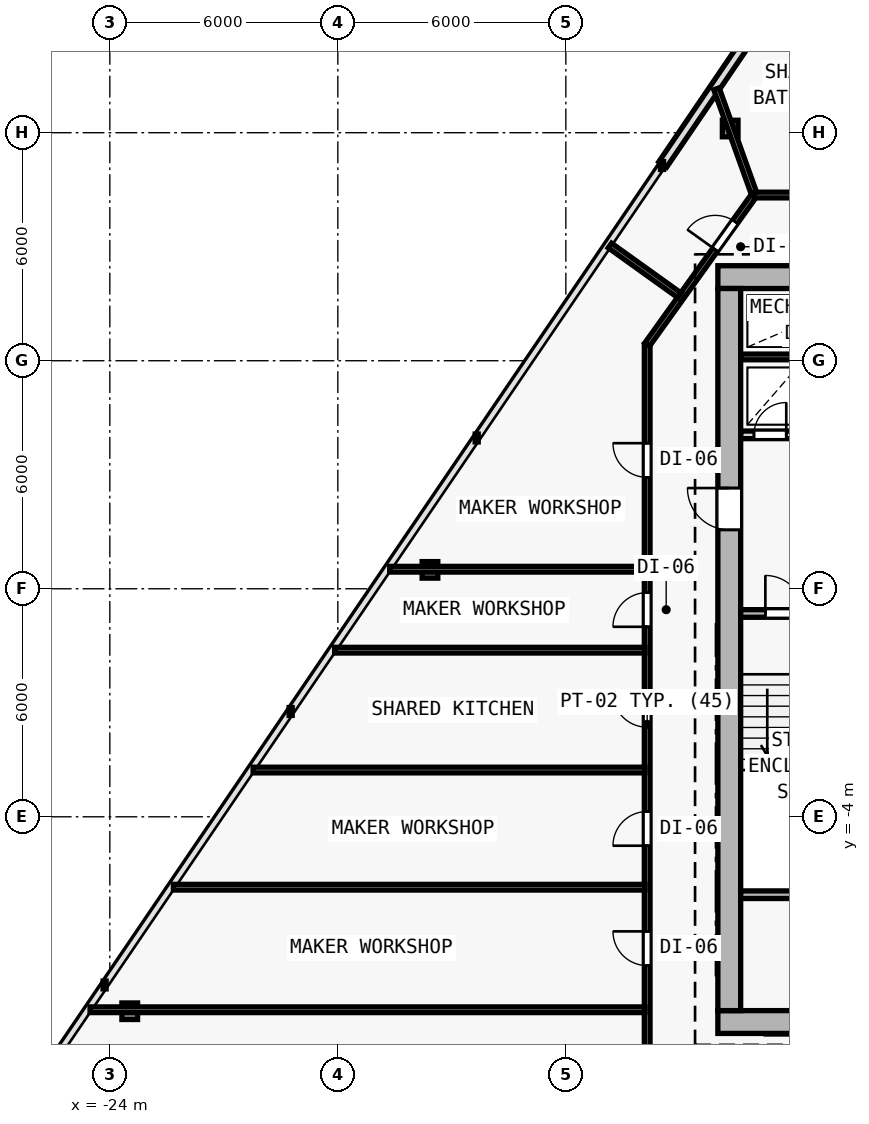
"""IFC4 building model, lengths in metres.
Left out: names, types, materials, properties, quantities, classifications, styles, units other than length and angle.
Written with IfcOpenShell. Run it as: python <this file> out.ifc"""

import sys

from ifc_helpers import new_model, si_unit, direction, frame, frame_2d, origin, origin_2d, place, context, subcontext, project, spatial, rectangle, i_section, extrude, element, fill, save


model = new_model("IFC4")
c1 = context("Model", 3, precision=1e-05, world=origin(), true_north=direction((0.0, 1.0)))
c2 = subcontext(c1, "Body", "Model", "MODEL_VIEW")
j1 = project(units=[si_unit("LENGTHUNIT", "METRE"), si_unit("PLANEANGLEUNIT", "RADIAN")], contexts=[c1])
p1 = place(None, origin())
s1 = spatial("IfcSite", under=j1, at=p1, CompositionType="ELEMENT")
p2 = place(p1, origin())
s2 = spatial("IfcBuilding", under=s1, at=p2, CompositionType="ELEMENT")
p3 = place(p2, frame((0.0, 0.0, 62.4)))
s3 = spatial("IfcBuildingStorey", under=s2, at=p3, CompositionType="ELEMENT", Elevation=62.4)
for number, where, z_axis, x_axis in (
    (1, (-7.7, -9.4, 0.0), (0.0, 0.0, 1.0), (1.0, 0.0, 0.0)),
    (2, (-7.7, 10.2, 0.0), (0.0, 0.0, 1.0), (1.0, 0.0, 0.0)),
    (3, (-7.7, 2.0, 0.0), (0.0, 0.0, 1.0), (1.0, 0.0, 0.0)),
):
    element("IfcColumn", number, at=place(p3, frame(where, z_axis=z_axis, x_axis=x_axis)), inside=s3, PredefinedType="COLUMN", context=c2, shape_type="SweptSolid", body=[
        extrude(i_section(OverallWidth=0.416, OverallDepth=0.446, WebThickness=0.025, FlangeThickness=0.04, FilletRadius=0.015, at=origin_2d()), origin(), (0.0, 0.0, 1.0), 3.6),
    ])
p4 = place(p3, frame((-7.676, 14.11, 0.006), z_axis=(0.00877514453, -0.002516901919, 0.999958330153), x_axis=(0.275705143097, 0.961242255662, 0.0)))
e4 = element("IfcColumn", 4, at=p4, inside=s3, PredefinedType="COLUMN", context=c2, shape_type="SweptSolid", body=[
    extrude(i_section(OverallWidth=0.412, OverallDepth=0.435, WebThickness=0.023, FlangeThickness=0.037, FilletRadius=0.015, at=origin_2d()), origin(), (0.0, 0.0, 1.0), 3.589),
])
p5 = place(p3, frame((-15.576, 2.497, 0.006), z_axis=(0.017003572908, 0.009522000828, 0.999810086971), x_axis=(-0.488603368932, 0.87250601595, 0.0)))
e5 = element("IfcColumn", 5, at=p5, inside=s3, PredefinedType="COLUMN", context=c2, shape_type="SweptSolid", body=[
    extrude(i_section(OverallWidth=0.412, OverallDepth=0.435, WebThickness=0.023, FlangeThickness=0.037, FilletRadius=0.015, at=origin_2d()), origin(), (0.0, 0.0, 1.0), 3.59),
])
p6 = place(p3, frame((-23.476, -9.116, 0.006), z_axis=(0.025224163578, 0.021620711639, 0.999447990843), x_axis=(-0.650791373456, 0.759256602365, 0.0)))
e6 = element("IfcColumn", 6, at=p6, inside=s3, PredefinedType="COLUMN", context=c2, shape_type="SweptSolid", body=[
    extrude(i_section(OverallWidth=0.412, OverallDepth=0.435, WebThickness=0.023, FlangeThickness=0.037, FilletRadius=0.015, at=origin_2d()), origin(), (0.0, 0.0, 1.0), 3.591),
])
p7 = place(p3, frame((-9.451, 13.163, 0.0), z_axis=(0.0, 0.0, 1.0), x_axis=(0.562478152622, 0.826812147844, 0.0)))
e7 = element("IfcWall", 7, at=p7, inside=s3, PredefinedType="SOLIDWALL", context=c2, shape_type="SweptSolid", body=[
    extrude(rectangle(XDim=12.232, YDim=0.25, at=frame_2d((6.116, 0.0))), origin(), (0.0, 0.0, 1.0), 3.35),
])
p8 = place(p7, frame((5.416, 0.0, 0.62)))
e8 = element("IfcOpeningElement", 8, at=p8, cuts=e7, PredefinedType="OPENING", context=c2, shape_type="SweptSolid", body=[
    extrude(rectangle(XDim=1.4, YDim=2.0, at=frame_2d((0.7, 1.0))), frame((0.0, 0.135, 0.0), z_axis=(0.0, -1.0, 0.0), x_axis=(1.0, 0.0, 0.0)), (0.0, 0.0, 1.0), 0.27),
])
p9 = place(p3, frame((-8.0, -9.4, 0.0), z_axis=(0.0, 0.0, 1.0), x_axis=(1.0, 0.0, 0.0)))
e9 = element("IfcWall", 9, at=p9, inside=s3, PredefinedType="SHEAR", context=c2, shape_type="SweptSolid", body=[
    extrude(rectangle(XDim=16.0, YDim=0.6, at=frame_2d((8.0, 0.0))), origin(), (0.0, 0.0, 1.0), 3.35),
])
p10 = place(p9, frame((9.65, 0.0, 0.0)))
e10 = element("IfcOpeningElement", 10, at=p10, cuts=e9, PredefinedType="OPENING", context=c2, shape_type="SweptSolid", body=[
    extrude(rectangle(XDim=1.5, YDim=2.2, at=frame_2d((0.75, 1.1))), frame((0.0, 0.31, 0.0), z_axis=(0.0, -1.0, 0.0), x_axis=(1.0, 0.0, 0.0)), (0.0, 0.0, 1.0), 0.62),
])
p11 = place(p3, frame((8.0, 10.2, 0.0), z_axis=(0.0, 0.0, 1.0), x_axis=(-1.0, 0.0, 0.0)))
e11 = element("IfcWall", 11, at=p11, inside=s3, PredefinedType="SHEAR", context=c2, shape_type="SweptSolid", body=[
    extrude(rectangle(XDim=16.0, YDim=0.6, at=frame_2d((8.0, 0.0))), origin(), (0.0, 0.0, 1.0), 3.35),
])
p12 = place(p11, frame((4.45, 0.0, 0.0)))
e12 = element("IfcOpeningElement", 12, at=p12, cuts=e11, PredefinedType="OPENING", context=c2, shape_type="SweptSolid", body=[
    extrude(rectangle(XDim=1.1, YDim=2.15, at=frame_2d((0.55, 1.075))), frame((0.0, 0.31, 0.0), z_axis=(0.0, -1.0, 0.0), x_axis=(1.0, 0.0, 0.0)), (0.0, 0.0, 1.0), 0.62),
])
p13 = place(p3, frame((-7.7, -9.1, 0.0), z_axis=(0.0, 0.0, 1.0), x_axis=(0.0, 1.0, 0.0)))
e13 = element("IfcWall", 13, at=p13, inside=s3, PredefinedType="SHEAR", context=c2, shape_type="SweptSolid", body=[
    extrude(rectangle(XDim=19.0, YDim=0.6, at=frame_2d((9.5, 0.0))), origin(), (0.0, 0.0, 1.0), 3.35),
])
p14 = place(p13, frame((12.65, 0.0, 0.0)))
e14 = element("IfcOpeningElement", 14, at=p14, cuts=e13, PredefinedType="OPENING", context=c2, shape_type="SweptSolid", body=[
    extrude(rectangle(XDim=1.1, YDim=2.15, at=frame_2d((0.55, 1.075))), frame((0.0, 0.31, 0.0), z_axis=(0.0, -1.0, 0.0), x_axis=(1.0, 0.0, 0.0)), (0.0, 0.0, 1.0), 0.62),
])
p15 = place(p3, frame((-7.4, 1.35, 0.0), z_axis=(0.0, 0.0, 1.0), x_axis=(1.0, 0.0, 0.0)))
e15 = element("IfcWall", 15, at=p15, inside=s3, PredefinedType="SOLIDWALL", context=c2, shape_type="SweptSolid", body=[
    extrude(rectangle(XDim=3.35, YDim=0.2, at=frame_2d((1.675, 0.0))), origin(), (0.0, 0.0, 1.0), 3.35),
])
p16 = place(p15, frame((0.65, 0.0, 0.0)))
e16 = element("IfcOpeningElement", 16, at=p16, cuts=e15, PredefinedType="OPENING", context=c2, shape_type="SweptSolid", body=[
    extrude(rectangle(XDim=1.0, YDim=2.15, at=frame_2d((0.5, 1.075))), frame((0.0, 0.11, 0.0), z_axis=(0.0, -1.0, 0.0), x_axis=(1.0, 0.0, 0.0)), (0.0, 0.0, 1.0), 0.22),
])
p17 = place(p3, frame((-7.395, 6.05, 0.0), z_axis=(0.0, 0.0, 1.0), x_axis=(1.0, 0.0, 0.0)))
e17 = element("IfcWall", 17, at=p17, inside=s3, PredefinedType="SOLIDWALL", context=c2, shape_type="SweptSolid", body=[
    extrude(rectangle(XDim=3.545, YDim=0.2, at=frame_2d((1.772, 0.0))), origin(), (0.0, 0.0, 1.0), 3.35),
])
p18 = place(p17, frame((0.345, 0.0, 0.0)))
e18 = element("IfcOpeningElement", 18, at=p18, cuts=e17, PredefinedType="OPENING", context=c2, shape_type="SweptSolid", body=[
    extrude(rectangle(XDim=0.85, YDim=2.1, at=frame_2d((0.425, 1.05))), frame((0.0, 0.11, 0.0), z_axis=(0.0, -1.0, 0.0), x_axis=(1.0, 0.0, 0.0)), (0.0, 0.0, 1.0), 0.22),
])
p19 = place(p17, frame((2.145, 0.0, 0.0)))
e19 = element("IfcOpeningElement", 19, at=p19, cuts=e17, PredefinedType="OPENING", context=c2, shape_type="SweptSolid", body=[
    extrude(rectangle(XDim=0.85, YDim=2.1, at=frame_2d((0.425, 1.05))), frame((0.0, 0.11, 0.0), z_axis=(0.0, -1.0, 0.0), x_axis=(1.0, 0.0, 0.0)), (0.0, 0.0, 1.0), 0.22),
])
p20 = place(p3, frame((-7.395, 8.1, 0.0), z_axis=(0.0, 0.0, 1.0), x_axis=(1.0, 0.0, 0.0)))
e20 = element("IfcWall", 20, at=p20, inside=s3, PredefinedType="PARTITIONING", context=c2, shape_type="SweptSolid", body=[
    extrude(rectangle(XDim=3.545, YDim=0.15, at=frame_2d((1.772, 0.0))), origin(), (0.0, 0.0, 1.0), 3.35),
])
p21 = place(p3, frame((-7.4, -6.05, 0.0), z_axis=(0.0, 0.0, 1.0), x_axis=(1.0, 0.0, 0.0)))
e21 = element("IfcWall", 21, at=p21, inside=s3, PredefinedType="SOLIDWALL", context=c2, shape_type="SweptSolid", body=[
    extrude(rectangle(XDim=3.35, YDim=0.2, at=frame_2d((1.675, 0.0))), origin(), (0.0, 0.0, 1.0), 3.35),
])
p22 = place(p3, frame((-9.86, -11.56, 0.0), z_axis=(0.0, 0.0, 1.0), x_axis=(0.0, 1.0, 0.0)))
e22 = element("IfcWall", 22, at=p22, inside=s3, PredefinedType="PARTITIONING", context=c2, shape_type="SweptSolid", body=[
    extrude(rectangle(XDim=19.986, YDim=0.15, at=frame_2d((9.993, 0.0))), origin(), (0.0, 0.0, 1.0), 2.609),
])
p23 = place(p22, frame((9.917, 0.0, 0.0)))
e23 = element("IfcOpeningElement", 23, at=p23, cuts=e22, PredefinedType="OPENING", context=c2, shape_type="SweptSolid", body=[
    extrude(rectangle(XDim=0.9, YDim=2.1, at=frame_2d((0.45, 1.05))), frame((0.0, 0.085, 0.0), z_axis=(0.0, -1.0, 0.0), x_axis=(1.0, 0.0, 0.0)), (0.0, 0.0, 1.0), 0.17),
])
p24 = place(p22, frame((6.799, 0.0, 0.0)))
e24 = element("IfcOpeningElement", 24, at=p24, cuts=e22, PredefinedType="OPENING", context=c2, shape_type="SweptSolid", body=[
    extrude(rectangle(XDim=0.9, YDim=2.1, at=frame_2d((0.45, 1.05))), frame((0.0, 0.085, 0.0), z_axis=(0.0, -1.0, 0.0), x_axis=(1.0, 0.0, 0.0)), (0.0, 0.0, 1.0), 0.17),
])
p25 = place(p22, frame((3.645, 0.0, 0.0)))
e25 = element("IfcOpeningElement", 25, at=p25, cuts=e22, PredefinedType="OPENING", context=c2, shape_type="SweptSolid", body=[
    extrude(rectangle(XDim=0.9, YDim=2.1, at=frame_2d((0.45, 1.05))), frame((0.0, 0.085, 0.0), z_axis=(0.0, -1.0, 0.0), x_axis=(1.0, 0.0, 0.0)), (0.0, 0.0, 1.0), 0.17),
])
p26 = place(p22, frame((16.491, 0.0, 0.0)))
e26 = element("IfcOpeningElement", 26, at=p26, cuts=e22, PredefinedType="OPENING", context=c2, shape_type="SweptSolid", body=[
    extrude(rectangle(XDim=0.9, YDim=2.1, at=frame_2d((0.45, 1.05))), frame((0.0, 0.085, 0.0), z_axis=(0.0, -1.0, 0.0), x_axis=(1.0, 0.0, 0.0)), (0.0, 0.0, 1.0), 0.17),
])
p27 = place(p22, frame((12.559, 0.0, 0.0)))
e27 = element("IfcOpeningElement", 27, at=p27, cuts=e22, PredefinedType="OPENING", context=c2, shape_type="SweptSolid", body=[
    extrude(rectangle(XDim=0.9, YDim=2.1, at=frame_2d((0.45, 1.05))), frame((0.0, 0.085, 0.0), z_axis=(0.0, -1.0, 0.0), x_axis=(1.0, 0.0, 0.0)), (0.0, 0.0, 1.0), 0.17),
])
p28 = place(p3, frame((-9.86, 8.426, 0.0), z_axis=(0.0, 0.0, 1.0), x_axis=(0.582449511476, 0.812866881218, 0.0)))
e28 = element("IfcWall", 28, at=p28, inside=s3, PredefinedType="PARTITIONING", context=c2, shape_type="SweptSolid", body=[
    extrude(rectangle(XDim=4.84, YDim=0.15, at=frame_2d((2.42, 0.0))), origin(), (0.0, 0.0, 1.0), 2.725),
])
p29 = place(p28, frame((3.074, 0.0, 0.0)))
e29 = element("IfcOpeningElement", 29, at=p29, cuts=e28, PredefinedType="OPENING", context=c2, shape_type="SweptSolid", body=[
    extrude(rectangle(XDim=0.9, YDim=2.1, at=frame_2d((0.45, 1.05))), frame((0.0, 0.085, 0.0), z_axis=(0.0, -1.0, 0.0), x_axis=(1.0, 0.0, 0.0)), (0.0, 0.0, 1.0), 0.17),
])
p30 = place(p3, frame((-7.041, 12.36, 0.0), z_axis=(0.0, 0.0, 1.0), x_axis=(1.0, 0.0, 0.0)))
e30 = element("IfcWall", 30, at=p30, inside=s3, PredefinedType="PARTITIONING", context=c2, shape_type="SweptSolid", body=[
    extrude(rectangle(XDim=14.082, YDim=0.15, at=frame_2d((7.041, 0.0))), origin(), (0.0, 0.0, 1.0), 3.35),
])
p31 = place(p30, frame((12.44, 0.0, 0.0)))
e31 = element("IfcOpeningElement", 31, at=p31, cuts=e30, PredefinedType="OPENING", context=c2, shape_type="SweptSolid", body=[
    extrude(rectangle(XDim=0.9, YDim=2.1, at=frame_2d((0.45, 1.05))), frame((0.0, 0.085, 0.0), z_axis=(0.0, -1.0, 0.0), x_axis=(1.0, 0.0, 0.0)), (0.0, 0.0, 1.0), 0.17),
])
p32 = place(p30, frame((9.225, 0.0, 0.0)))
e32 = element("IfcOpeningElement", 32, at=p32, cuts=e30, PredefinedType="OPENING", context=c2, shape_type="SweptSolid", body=[
    extrude(rectangle(XDim=0.9, YDim=2.1, at=frame_2d((0.45, 1.05))), frame((0.0, 0.085, 0.0), z_axis=(0.0, -1.0, 0.0), x_axis=(1.0, 0.0, 0.0)), (0.0, 0.0, 1.0), 0.17),
])
p33 = place(p30, frame((4.866, 0.0, 0.0)))
e33 = element("IfcOpeningElement", 33, at=p33, cuts=e30, PredefinedType="OPENING", context=c2, shape_type="SweptSolid", body=[
    extrude(rectangle(XDim=0.9, YDim=2.1, at=frame_2d((0.45, 1.05))), frame((0.0, 0.085, 0.0), z_axis=(0.0, -1.0, 0.0), x_axis=(1.0, 0.0, 0.0)), (0.0, 0.0, 1.0), 0.17),
])
p34 = place(p30, frame((1.218, 0.0, 0.0)))
e34 = element("IfcOpeningElement", 34, at=p34, cuts=e30, PredefinedType="OPENING", context=c2, shape_type="SweptSolid", body=[
    extrude(rectangle(XDim=0.9, YDim=2.1, at=frame_2d((0.45, 1.05))), frame((0.0, 0.085, 0.0), z_axis=(0.0, -1.0, 0.0), x_axis=(1.0, 0.0, 0.0)), (0.0, 0.0, 1.0), 0.17),
])
p35 = place(p3, frame((-7.052, 12.41, 0.0), z_axis=(0.0, 0.0, 1.0), x_axis=(-0.337577506443, 0.941297735652, 0.0)))
e35 = element("IfcWall", 35, at=p35, inside=s3, PredefinedType="PARTITIONING", context=c2, shape_type="SweptSolid", body=[
    extrude(rectangle(XDim=2.915, YDim=0.15, at=frame_2d((1.458, 0.0))), origin(), (0.0, 0.0, 1.0), 2.725),
])
p36 = place(p3, frame((-9.92, 2.514, 0.0), z_axis=(0.0, 0.0, 1.0), x_axis=(-1.0, 0.0, 0.0)))
e36 = element("IfcWall", 36, at=p36, inside=s3, PredefinedType="PARTITIONING", context=c2, shape_type="SweptSolid", body=[
    extrude(rectangle(XDim=6.715, YDim=0.15, at=frame_2d((3.357, 0.0))), origin(), (0.0, 0.0, 1.0), 2.735),
])
p37 = place(p3, frame((-9.92, -9.077, 0.0), z_axis=(0.0, 0.0, 1.0), x_axis=(-1.0, 0.0, 0.0)))
e37 = element("IfcWall", 37, at=p37, inside=s3, PredefinedType="PARTITIONING", context=c2, shape_type="SweptSolid", body=[
    extrude(rectangle(XDim=14.6, YDim=0.15, at=frame_2d((7.3, 0.0))), origin(), (0.0, 0.0, 1.0), 2.609),
])
p38 = place(p3, frame((-9.92, -2.77, 0.0), z_axis=(0.0, 0.0, 1.0), x_axis=(-1.0, 0.0, 0.0)))
e38 = element("IfcWall", 38, at=p38, inside=s3, PredefinedType="PARTITIONING", context=c2, shape_type="SweptSolid", body=[
    extrude(rectangle(XDim=10.309, YDim=0.15, at=frame_2d((5.155, 0.0))), origin(), (0.0, 0.0, 1.0), 2.725),
])
p39 = place(p3, frame((-9.008, 9.718, 0.0), z_axis=(0.0, 0.0, 1.0), x_axis=(-0.812920514328, 0.582374653797, 0.0)))
e39 = element("IfcWall", 39, at=p39, inside=s3, PredefinedType="PARTITIONING", context=c2, shape_type="SweptSolid", body=[
    extrude(rectangle(XDim=2.255, YDim=0.15, at=frame_2d((1.127, 0.0))), origin(), (0.0, 0.0, 1.0), 2.735),
])
p40 = place(p3, frame((-9.92, 0.384, 0.0), z_axis=(0.0, 0.0, 1.0), x_axis=(-1.0, 0.0, 0.0)))
e40 = element("IfcWall", 40, at=p40, inside=s3, PredefinedType="PARTITIONING", context=c2, shape_type="SweptSolid", body=[
    extrude(rectangle(XDim=8.164, YDim=0.15, at=frame_2d((4.082, 0.0))), origin(), (0.0, 0.0, 1.0), 2.725),
])
p41 = place(p3, frame((-9.92, -5.853, 0.0), z_axis=(0.0, 0.0, 1.0), x_axis=(-1.0, 0.0, 0.0)))
e41 = element("IfcWall", 41, at=p41, inside=s3, PredefinedType="PARTITIONING", context=c2, shape_type="SweptSolid", body=[
    extrude(rectangle(XDim=12.406, YDim=0.15, at=frame_2d((6.203, 0.0))), origin(), (0.0, 0.0, 1.0), 2.725),
])
p42 = place(p14, origin())
e42 = element("IfcDoor", 42, at=p42, inside=s3, OperationType="SINGLE_SWING_RIGHT", PredefinedType="DOOR", context=c2, shape_type="SweptSolid", body=[
    extrude(rectangle(XDim=1.1, YDim=2.15, at=frame_2d((0.55, 1.075))), frame((0.0, 0.025, 0.0), z_axis=(0.0, -1.0, 0.0), x_axis=(1.0, 0.0, 0.0)), (0.0, 0.0, 1.0), 0.05),
])
fill(e14, e42)
p43 = place(p16, origin())
e43 = element("IfcDoor", 43, at=p43, inside=s3, OperationType="SINGLE_SWING_LEFT", PredefinedType="DOOR", context=c2, shape_type="SweptSolid", body=[
    extrude(rectangle(XDim=1.0, YDim=2.15, at=frame_2d((0.5, 1.075))), frame((0.0, 0.025, 0.0), z_axis=(0.0, -1.0, 0.0), x_axis=(1.0, 0.0, 0.0)), (0.0, 0.0, 1.0), 0.05),
])
fill(e16, e43)
p44 = place(p18, origin())
e44 = element("IfcDoor", 44, at=p44, inside=s3, OperationType="SINGLE_SWING_RIGHT", PredefinedType="DOOR", context=c2, shape_type="SweptSolid", body=[
    extrude(rectangle(XDim=0.85, YDim=2.1, at=frame_2d((0.425, 1.05))), frame((0.0, 0.025, 0.0), z_axis=(0.0, -1.0, 0.0), x_axis=(1.0, 0.0, 0.0)), (0.0, 0.0, 1.0), 0.05),
])
fill(e18, e44)
p45 = place(p23, origin())
e45 = element("IfcDoor", 45, at=p45, inside=s3, OperationType="SINGLE_SWING_RIGHT", PredefinedType="DOOR", context=c2, shape_type="SweptSolid", body=[
    extrude(rectangle(XDim=0.9, YDim=2.1, at=frame_2d((0.45, 1.05))), frame((0.0, 0.025, 0.0), z_axis=(0.0, -1.0, 0.0), x_axis=(1.0, 0.0, 0.0)), (0.0, 0.0, 1.0), 0.05),
])
fill(e23, e45)
p46 = place(p24, origin())
e46 = element("IfcDoor", 46, at=p46, inside=s3, OperationType="SINGLE_SWING_LEFT", PredefinedType="DOOR", context=c2, shape_type="SweptSolid", body=[
    extrude(rectangle(XDim=0.9, YDim=2.1, at=frame_2d((0.45, 1.05))), frame((0.0, 0.025, 0.0), z_axis=(0.0, -1.0, 0.0), x_axis=(1.0, 0.0, 0.0)), (0.0, 0.0, 1.0), 0.05),
])
fill(e24, e46)
p47 = place(p25, origin())
e47 = element("IfcDoor", 47, at=p47, inside=s3, OperationType="SINGLE_SWING_RIGHT", PredefinedType="DOOR", context=c2, shape_type="SweptSolid", body=[
    extrude(rectangle(XDim=0.9, YDim=2.1, at=frame_2d((0.45, 1.05))), frame((0.0, 0.025, 0.0), z_axis=(0.0, -1.0, 0.0), x_axis=(1.0, 0.0, 0.0)), (0.0, 0.0, 1.0), 0.05),
])
fill(e25, e47)
p48 = place(p29, origin())
e48 = element("IfcDoor", 48, at=p48, inside=s3, OperationType="SINGLE_SWING_LEFT", PredefinedType="DOOR", context=c2, shape_type="SweptSolid", body=[
    extrude(rectangle(XDim=0.9, YDim=2.1, at=frame_2d((0.45, 1.05))), frame((0.0, 0.025, 0.0), z_axis=(0.0, -1.0, 0.0), x_axis=(1.0, 0.0, 0.0)), (0.0, 0.0, 1.0), 0.05),
])
fill(e29, e48)
p49 = place(p26, origin())
e49 = element("IfcDoor", 49, at=p49, inside=s3, OperationType="SINGLE_SWING_RIGHT", PredefinedType="DOOR", context=c2, shape_type="SweptSolid", body=[
    extrude(rectangle(XDim=0.9, YDim=2.1, at=frame_2d((0.45, 1.05))), frame((0.0, 0.025, 0.0), z_axis=(0.0, -1.0, 0.0), x_axis=(1.0, 0.0, 0.0)), (0.0, 0.0, 1.0), 0.05),
])
fill(e26, e49)
p50 = place(p27, origin())
e50 = element("IfcDoor", 50, at=p50, inside=s3, OperationType="SINGLE_SWING_LEFT", PredefinedType="DOOR", context=c2, shape_type="SweptSolid", body=[
    extrude(rectangle(XDim=0.9, YDim=2.1, at=frame_2d((0.45, 1.05))), frame((0.0, 0.025, 0.0), z_axis=(0.0, -1.0, 0.0), x_axis=(1.0, 0.0, 0.0)), (0.0, 0.0, 1.0), 0.05),
])
fill(e27, e50)
save(model, sys.argv[1])
